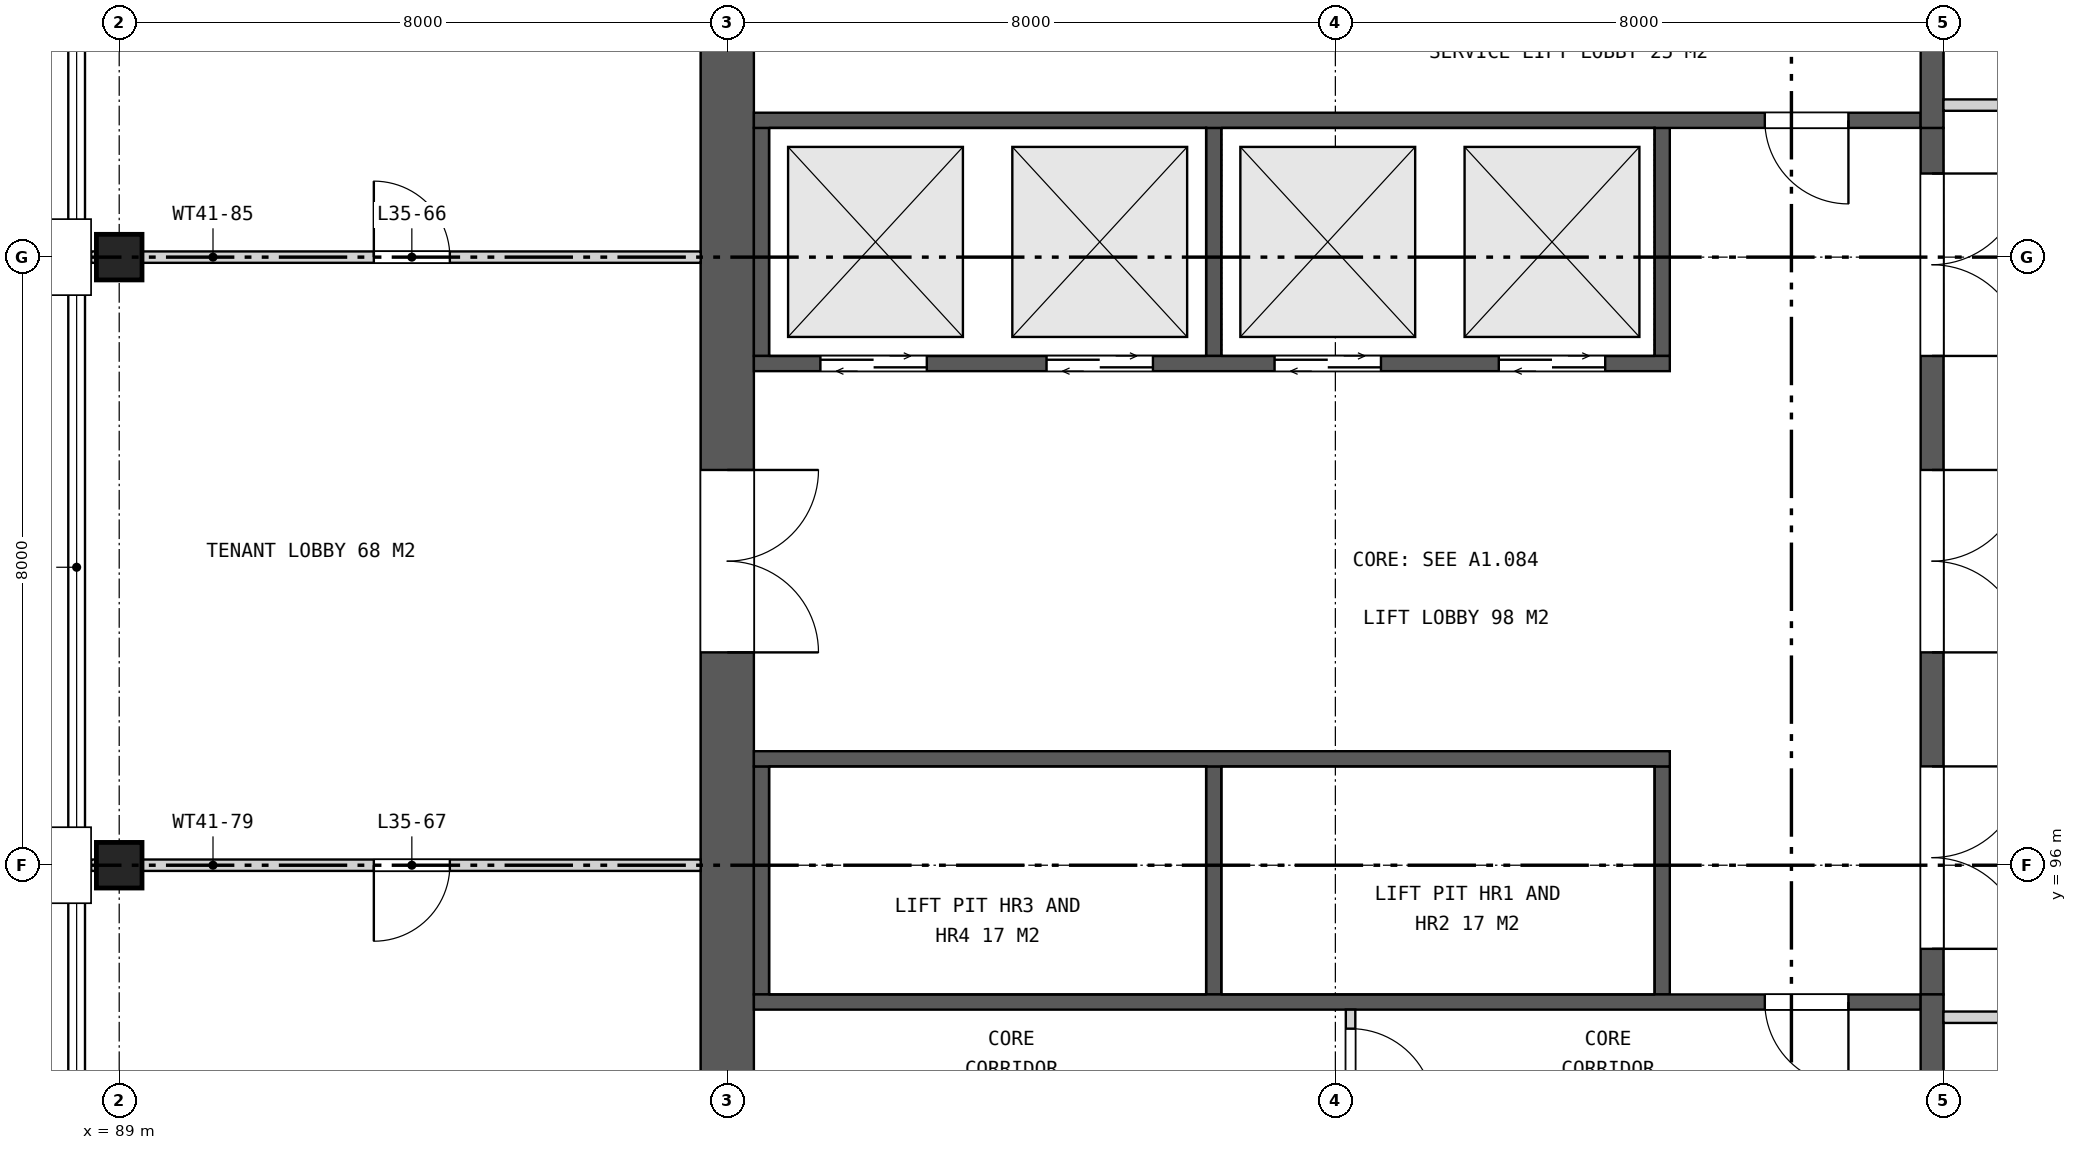
"""IFC4 building model, lengths in metres.
Left out: names, types, materials, properties, quantities, classifications, styles, units other than length and angle.
Written with IfcOpenShell. Run it as: python <this file> out.ifc"""

import sys

from ifc_helpers import new_model, si_unit, direction, frame, frame_2d, origin, origin_2d, place, context, subcontext, project, spatial, rectangle, extrude, element, fill, save


model = new_model("IFC4")
c1 = context("Model", 3, precision=1e-05, world=origin(), true_north=direction((0.0, 1.0)))
c2 = subcontext(c1, "Body", "Model", "MODEL_VIEW")
j1 = project(units=[si_unit("LENGTHUNIT", "METRE"), si_unit("PLANEANGLEUNIT", "RADIAN")], contexts=[c1])
p1 = place(None, origin())
s1 = spatial("IfcSite", under=j1, at=p1, CompositionType="ELEMENT")
p2 = place(p1, origin())
s2 = spatial("IfcBuilding", under=s1, at=p2, CompositionType="ELEMENT")
p3 = place(p2, frame((0.0, 0.0, 167.3)))
s3 = spatial("IfcBuildingStorey", under=s2, at=p3, CompositionType="ELEMENT", Elevation=167.3)
for number, where, z_axis, x_axis in (
    (1, (89.0, 96.0, 0.0), (0.0, 0.0, 1.0), (1.0, 0.0, 0.0)),
    (2, (89.0, 104.0, 0.0), (0.0, 0.0, 1.0), (1.0, 0.0, 0.0)),
):
    element("IfcColumn", number, at=place(p3, frame(where, z_axis=z_axis, x_axis=x_axis)), inside=s3, PredefinedType="COLUMN", context=c2, shape_type="SweptSolid", body=[
        extrude(rectangle(XDim=0.6, YDim=0.6, at=origin_2d()), origin(), (0.0, 0.0, 1.0), 4.2),
    ])
p4 = place(p3, frame((97.0, 111.65, 0.0), z_axis=(0.0, 0.0, 1.0), x_axis=(0.0, -1.0, 0.0)))
e3 = element("IfcWall", 3, at=p4, inside=s3, PredefinedType="SHEAR", context=c2, shape_type="SweptSolid", body=[
    extrude(rectangle(XDim=23.3, YDim=0.7, at=frame_2d((11.65, 0.0))), origin(), (0.0, 0.0, 1.0), 4.2),
])
p5 = place(p4, frame((10.45, 0.0, 0.0)))
e4 = element("IfcOpeningElement", 4, at=p5, cuts=e3, PredefinedType="OPENING", context=c2, shape_type="SweptSolid", body=[
    extrude(rectangle(XDim=2.4, YDim=2.4, at=frame_2d((1.2, 1.2))), frame((0.0, 0.36, 0.0), z_axis=(0.0, -1.0, 0.0), x_axis=(1.0, 0.0, 0.0)), (0.0, 0.0, 1.0), 0.72),
])
p6 = place(p3, frame((112.85, 105.7, 0.0), z_axis=(0.0, 0.0, 1.0), x_axis=(0.0, -1.0, 0.0)))
e5 = element("IfcWall", 5, at=p6, inside=s3, PredefinedType="SHEAR", context=c2, shape_type="SweptSolid", body=[
    extrude(rectangle(XDim=11.4, YDim=0.3, at=frame_2d((5.7, 0.0))), origin(), (0.0, 0.0, 1.0), 4.2),
])
p7 = place(p6, frame((0.6, 0.0, 0.0)))
e6 = element("IfcOpeningElement", 6, at=p7, cuts=e5, PredefinedType="OPENING", context=c2, shape_type="SweptSolid", body=[
    extrude(rectangle(XDim=2.4, YDim=2.4, at=frame_2d((1.2, 1.2))), frame((0.0, 0.16, 0.0), z_axis=(0.0, -1.0, 0.0), x_axis=(1.0, 0.0, 0.0)), (0.0, 0.0, 1.0), 0.32),
])
p8 = place(p6, frame((4.5, 0.0, 0.0)))
e7 = element("IfcOpeningElement", 7, at=p8, cuts=e5, PredefinedType="OPENING", context=c2, shape_type="SweptSolid", body=[
    extrude(rectangle(XDim=2.4, YDim=2.4, at=frame_2d((1.2, 1.2))), frame((0.0, 0.16, 0.0), z_axis=(0.0, -1.0, 0.0), x_axis=(1.0, 0.0, 0.0)), (0.0, 0.0, 1.0), 0.32),
])
p9 = place(p6, frame((8.4, 0.0, 0.0)))
e8 = element("IfcOpeningElement", 8, at=p9, cuts=e5, PredefinedType="OPENING", context=c2, shape_type="SweptSolid", body=[
    extrude(rectangle(XDim=2.4, YDim=2.4, at=frame_2d((1.2, 1.2))), frame((0.0, 0.16, 0.0), z_axis=(0.0, -1.0, 0.0), x_axis=(1.0, 0.0, 0.0)), (0.0, 0.0, 1.0), 0.32),
])
for number, where, z_axis, x_axis in (
    (9, (109.3, 97.3, 0.0), (0.0, 0.0, 1.0), (0.0, -1.0, 0.0)),
    (10, (103.4, 97.3, 0.0), (0.0, 0.0, 1.0), (0.0, -1.0, 0.0)),
    (11, (97.45, 97.3, 0.0), (0.0, 0.0, 1.0), (0.0, -1.0, 0.0)),
):
    element("IfcWall", number, at=place(p3, frame(where, z_axis=z_axis, x_axis=x_axis)), inside=s3, PredefinedType="SHEAR", context=c2, shape_type="SweptSolid", body=[
        extrude(rectangle(XDim=3.0, YDim=0.2, at=frame_2d((1.5, 0.0))), origin(), (0.0, 0.0, 1.0), 4.2),
    ])
p10 = place(p3, frame((109.4, 97.4, 0.0), z_axis=(0.0, 0.0, 1.0), x_axis=(-1.0, 0.0, 0.0)))
e12 = element("IfcWall", 12, at=p10, inside=s3, PredefinedType="SHEAR", context=c2, shape_type="SweptSolid", body=[
    extrude(rectangle(XDim=12.05, YDim=0.2, at=frame_2d((6.025, 0.0))), origin(), (0.0, 0.0, 1.0), 4.2),
])
for number, where, z_axis, x_axis in (
    (13, (109.3, 105.7, 0.0), (0.0, 0.0, 1.0), (0.0, -1.0, 0.0)),
    (14, (103.4, 105.7, 0.0), (0.0, 0.0, 1.0), (0.0, -1.0, 0.0)),
    (15, (97.45, 105.7, 0.0), (0.0, 0.0, 1.0), (0.0, -1.0, 0.0)),
):
    element("IfcWall", number, at=place(p3, frame(where, z_axis=z_axis, x_axis=x_axis)), inside=s3, PredefinedType="SHEAR", context=c2, shape_type="SweptSolid", body=[
        extrude(rectangle(XDim=3.0, YDim=0.2, at=frame_2d((1.5, 0.0))), origin(), (0.0, 0.0, 1.0), 4.2),
    ])
p11 = place(p3, frame((109.4, 102.6, 0.0), z_axis=(0.0, 0.0, 1.0), x_axis=(-1.0, 0.0, 0.0)))
e16 = element("IfcWall", 16, at=p11, inside=s3, PredefinedType="SHEAR", context=c2, shape_type="SweptSolid", body=[
    extrude(rectangle(XDim=12.05, YDim=0.2, at=frame_2d((6.025, 0.0))), origin(), (0.0, 0.0, 1.0), 4.2),
])
p12 = place(p11, frame((0.85, 0.0, 0.0)))
e17 = element("IfcOpeningElement", 17, at=p12, cuts=e16, PredefinedType="OPENING", context=c2, shape_type="SweptSolid", body=[
    extrude(rectangle(XDim=1.4, YDim=2.1, at=frame_2d((0.7, 1.05))), frame((0.0, 0.11, 0.0), z_axis=(0.0, -1.0, 0.0), x_axis=(1.0, 0.0, 0.0)), (0.0, 0.0, 1.0), 0.22),
])
p13 = place(p11, frame((3.8, 0.0, 0.0)))
e18 = element("IfcOpeningElement", 18, at=p13, cuts=e16, PredefinedType="OPENING", context=c2, shape_type="SweptSolid", body=[
    extrude(rectangle(XDim=1.4, YDim=2.1, at=frame_2d((0.7, 1.05))), frame((0.0, 0.11, 0.0), z_axis=(0.0, -1.0, 0.0), x_axis=(1.0, 0.0, 0.0)), (0.0, 0.0, 1.0), 0.22),
])
p14 = place(p11, frame((6.8, 0.0, 0.0)))
e19 = element("IfcOpeningElement", 19, at=p14, cuts=e16, PredefinedType="OPENING", context=c2, shape_type="SweptSolid", body=[
    extrude(rectangle(XDim=1.4, YDim=2.1, at=frame_2d((0.7, 1.05))), frame((0.0, 0.11, 0.0), z_axis=(0.0, -1.0, 0.0), x_axis=(1.0, 0.0, 0.0)), (0.0, 0.0, 1.0), 0.22),
])
p15 = place(p11, frame((9.775, 0.0, 0.0)))
e20 = element("IfcOpeningElement", 20, at=p15, cuts=e16, PredefinedType="OPENING", context=c2, shape_type="SweptSolid", body=[
    extrude(rectangle(XDim=1.4, YDim=2.1, at=frame_2d((0.7, 1.05))), frame((0.0, 0.11, 0.0), z_axis=(0.0, -1.0, 0.0), x_axis=(1.0, 0.0, 0.0)), (0.0, 0.0, 1.0), 0.22),
])
p16 = place(p3, frame((112.7, 94.2, 0.0), z_axis=(0.0, 0.0, 1.0), x_axis=(-1.0, 0.0, 0.0)))
e21 = element("IfcWall", 21, at=p16, inside=s3, PredefinedType="SHEAR", context=c2, shape_type="SweptSolid", body=[
    extrude(rectangle(XDim=15.35, YDim=0.2, at=frame_2d((7.675, 0.0))), origin(), (0.0, 0.0, 1.0), 4.2),
])
p17 = place(p16, frame((0.95, 0.0, 0.0)))
e22 = element("IfcOpeningElement", 22, at=p17, cuts=e21, PredefinedType="OPENING", context=c2, shape_type="SweptSolid", body=[
    extrude(rectangle(XDim=1.1, YDim=2.1, at=frame_2d((0.55, 1.05))), frame((0.0, 0.11, 0.0), z_axis=(0.0, -1.0, 0.0), x_axis=(1.0, 0.0, 0.0)), (0.0, 0.0, 1.0), 0.22),
])
p18 = place(p3, frame((112.85, 94.3, 0.0), z_axis=(0.0, 0.0, 1.0), x_axis=(0.0, -1.0, 0.0)))
e23 = element("IfcWall", 23, at=p18, inside=s3, PredefinedType="SHEAR", context=c2, shape_type="SweptSolid", body=[
    extrude(rectangle(XDim=5.95, YDim=0.3, at=frame_2d((2.975, 0.0))), origin(), (0.0, 0.0, 1.0), 4.2),
])
p19 = place(p3, frame((105.2, 94.1, 0.0), z_axis=(0.0, 0.0, 1.0), x_axis=(0.0, -1.0, 0.0)))
e24 = element("IfcWall", 24, at=p19, inside=s3, PredefinedType="PARTITIONING", context=c2, shape_type="SweptSolid", body=[
    extrude(rectangle(XDim=1.6, YDim=0.125, at=frame_2d((0.8, 0.0))), origin(), (0.0, 0.0, 1.0), 4.2),
])
p20 = place(p19, frame((0.25, 0.0, 0.0)))
e25 = element("IfcOpeningElement", 25, at=p20, cuts=e24, PredefinedType="OPENING", context=c2, shape_type="SweptSolid", body=[
    extrude(rectangle(XDim=1.1, YDim=2.1, at=frame_2d((0.55, 1.05))), frame((0.0, 0.073, 0.0), z_axis=(0.0, -1.0, 0.0), x_axis=(1.0, 0.0, 0.0)), (0.0, 0.0, 1.0), 0.145),
])
p21 = place(p3, frame((112.7, 105.8, 0.0), z_axis=(0.0, 0.0, 1.0), x_axis=(-1.0, 0.0, 0.0)))
e26 = element("IfcWall", 26, at=p21, inside=s3, PredefinedType="SHEAR", context=c2, shape_type="SweptSolid", body=[
    extrude(rectangle(XDim=15.35, YDim=0.2, at=frame_2d((7.675, 0.0))), origin(), (0.0, 0.0, 1.0), 4.2),
])
p22 = place(p21, frame((0.95, 0.0, 0.0)))
e27 = element("IfcOpeningElement", 27, at=p22, cuts=e26, PredefinedType="OPENING", context=c2, shape_type="SweptSolid", body=[
    extrude(rectangle(XDim=1.1, YDim=2.1, at=frame_2d((0.55, 1.05))), frame((0.0, 0.11, 0.0), z_axis=(0.0, -1.0, 0.0), x_axis=(1.0, 0.0, 0.0)), (0.0, 0.0, 1.0), 0.22),
])
p23 = place(p3, frame((112.85, 111.65, 0.0), z_axis=(0.0, 0.0, 1.0), x_axis=(0.0, -1.0, 0.0)))
e28 = element("IfcWall", 28, at=p23, inside=s3, PredefinedType="SHEAR", context=c2, shape_type="SweptSolid", body=[
    extrude(rectangle(XDim=5.95, YDim=0.3, at=frame_2d((2.975, 0.0))), origin(), (0.0, 0.0, 1.0), 4.2),
])
p24 = place(p3, frame((113.0, 94.0, 0.0), z_axis=(0.0, 0.0, 1.0), x_axis=(1.0, 0.0, 0.0)))
e29 = element("IfcWall", 29, at=p24, inside=s3, PredefinedType="PARTITIONING", context=c2, shape_type="SweptSolid", body=[
    extrude(rectangle(XDim=10.725, YDim=0.15, at=frame_2d((5.363, 0.0))), origin(), (0.0, 0.0, 1.0), 3.26),
])
p25 = place(p3, frame((88.63, 96.0, 0.0), z_axis=(0.0, 0.0, 1.0), x_axis=(1.0, 0.0, 0.0)))
e30 = element("IfcWall", 30, at=p25, inside=s3, PredefinedType="PARTITIONING", context=c2, shape_type="SweptSolid", body=[
    extrude(rectangle(XDim=8.02, YDim=0.15, at=frame_2d((4.01, 0.0))), origin(), (0.0, 0.0, 1.0), 3.26),
])
p26 = place(p25, frame((3.72, 0.0, 0.0)))
e31 = element("IfcOpeningElement", 31, at=p26, cuts=e30, PredefinedType="OPENING", context=c2, shape_type="SweptSolid", body=[
    extrude(rectangle(XDim=1.0, YDim=2.1, at=frame_2d((0.5, 1.05))), frame((0.0, 0.085, 0.0), z_axis=(0.0, -1.0, 0.0), x_axis=(1.0, 0.0, 0.0)), (0.0, 0.0, 1.0), 0.17),
])
p27 = place(p3, frame((88.63, 104.0, 0.0), z_axis=(0.0, 0.0, 1.0), x_axis=(1.0, 0.0, 0.0)))
e32 = element("IfcWall", 32, at=p27, inside=s3, PredefinedType="PARTITIONING", context=c2, shape_type="SweptSolid", body=[
    extrude(rectangle(XDim=8.02, YDim=0.15, at=frame_2d((4.01, 0.0))), origin(), (0.0, 0.0, 1.0), 3.26),
])
p28 = place(p27, frame((3.72, 0.0, 0.0)))
e33 = element("IfcOpeningElement", 33, at=p28, cuts=e32, PredefinedType="OPENING", context=c2, shape_type="SweptSolid", body=[
    extrude(rectangle(XDim=1.0, YDim=2.1, at=frame_2d((0.5, 1.05))), frame((0.0, 0.085, 0.0), z_axis=(0.0, -1.0, 0.0), x_axis=(1.0, 0.0, 0.0)), (0.0, 0.0, 1.0), 0.17),
])
p29 = place(p3, frame((113.0, 106.0, 0.0), z_axis=(0.0, 0.0, 1.0), x_axis=(1.0, 0.0, 0.0)))
e34 = element("IfcWall", 34, at=p29, inside=s3, PredefinedType="PARTITIONING", context=c2, shape_type="SweptSolid", body=[
    extrude(rectangle(XDim=10.725, YDim=0.15, at=frame_2d((5.363, 0.0))), origin(), (0.0, 0.0, 1.0), 3.26),
])
p30 = place(p5, origin())
e35 = element("IfcDoor", 35, at=p30, inside=s3, OperationType="DOUBLE_DOOR_SINGLE_SWING", PredefinedType="DOOR", context=c2, shape_type="SweptSolid", body=[
    extrude(rectangle(XDim=2.4, YDim=2.4, at=frame_2d((1.2, 1.2))), frame((0.0, 0.025, 0.0), z_axis=(0.0, -1.0, 0.0), x_axis=(1.0, 0.0, 0.0)), (0.0, 0.0, 1.0), 0.05),
])
fill(e4, e35)
p31 = place(p7, origin())
e36 = element("IfcDoor", 36, at=p31, inside=s3, OperationType="DOUBLE_DOOR_SINGLE_SWING", PredefinedType="DOOR", context=c2, shape_type="SweptSolid", body=[
    extrude(rectangle(XDim=2.4, YDim=2.4, at=frame_2d((1.2, 1.2))), frame((0.0, 0.025, 0.0), z_axis=(0.0, -1.0, 0.0), x_axis=(1.0, 0.0, 0.0)), (0.0, 0.0, 1.0), 0.05),
])
fill(e6, e36)
p32 = place(p8, origin())
e37 = element("IfcDoor", 37, at=p32, inside=s3, OperationType="DOUBLE_DOOR_SINGLE_SWING", PredefinedType="DOOR", context=c2, shape_type="SweptSolid", body=[
    extrude(rectangle(XDim=2.4, YDim=2.4, at=frame_2d((1.2, 1.2))), frame((0.0, 0.025, 0.0), z_axis=(0.0, -1.0, 0.0), x_axis=(1.0, 0.0, 0.0)), (0.0, 0.0, 1.0), 0.05),
])
fill(e7, e37)
p33 = place(p9, origin())
e38 = element("IfcDoor", 38, at=p33, inside=s3, OperationType="DOUBLE_DOOR_SINGLE_SWING", PredefinedType="DOOR", context=c2, shape_type="SweptSolid", body=[
    extrude(rectangle(XDim=2.4, YDim=2.4, at=frame_2d((1.2, 1.2))), frame((0.0, 0.025, 0.0), z_axis=(0.0, -1.0, 0.0), x_axis=(1.0, 0.0, 0.0)), (0.0, 0.0, 1.0), 0.05),
])
fill(e8, e38)
p34 = place(p12, origin())
e39 = element("IfcDoor", 39, at=p34, inside=s3, OperationType="DOUBLE_DOOR_SLIDING", PredefinedType="DOOR", context=c2, shape_type="SweptSolid", body=[
    extrude(rectangle(XDim=1.4, YDim=2.1, at=frame_2d((0.7, 1.05))), frame((0.0, 0.025, 0.0), z_axis=(0.0, -1.0, 0.0), x_axis=(1.0, 0.0, 0.0)), (0.0, 0.0, 1.0), 0.05),
])
fill(e17, e39)
p35 = place(p13, origin())
e40 = element("IfcDoor", 40, at=p35, inside=s3, OperationType="DOUBLE_DOOR_SLIDING", PredefinedType="DOOR", context=c2, shape_type="SweptSolid", body=[
    extrude(rectangle(XDim=1.4, YDim=2.1, at=frame_2d((0.7, 1.05))), frame((0.0, 0.025, 0.0), z_axis=(0.0, -1.0, 0.0), x_axis=(1.0, 0.0, 0.0)), (0.0, 0.0, 1.0), 0.05),
])
fill(e18, e40)
p36 = place(p14, origin())
e41 = element("IfcDoor", 41, at=p36, inside=s3, OperationType="DOUBLE_DOOR_SLIDING", PredefinedType="DOOR", context=c2, shape_type="SweptSolid", body=[
    extrude(rectangle(XDim=1.4, YDim=2.1, at=frame_2d((0.7, 1.05))), frame((0.0, 0.025, 0.0), z_axis=(0.0, -1.0, 0.0), x_axis=(1.0, 0.0, 0.0)), (0.0, 0.0, 1.0), 0.05),
])
fill(e19, e41)
p37 = place(p15, origin())
e42 = element("IfcDoor", 42, at=p37, inside=s3, OperationType="DOUBLE_DOOR_SLIDING", PredefinedType="DOOR", context=c2, shape_type="SweptSolid", body=[
    extrude(rectangle(XDim=1.4, YDim=2.1, at=frame_2d((0.7, 1.05))), frame((0.0, 0.025, 0.0), z_axis=(0.0, -1.0, 0.0), x_axis=(1.0, 0.0, 0.0)), (0.0, 0.0, 1.0), 0.05),
])
fill(e20, e42)
p38 = place(p17, origin())
e43 = element("IfcDoor", 43, at=p38, inside=s3, OperationType="SINGLE_SWING_LEFT", PredefinedType="DOOR", context=c2, shape_type="SweptSolid", body=[
    extrude(rectangle(XDim=1.1, YDim=2.1, at=frame_2d((0.55, 1.05))), frame((0.0, 0.025, 0.0), z_axis=(0.0, -1.0, 0.0), x_axis=(1.0, 0.0, 0.0)), (0.0, 0.0, 1.0), 0.05),
])
fill(e22, e43)
p39 = place(p20, origin())
e44 = element("IfcDoor", 44, at=p39, inside=s3, OperationType="SINGLE_SWING_RIGHT", PredefinedType="DOOR", context=c2, shape_type="SweptSolid", body=[
    extrude(rectangle(XDim=1.1, YDim=2.1, at=frame_2d((0.55, 1.05))), frame((0.0, 0.025, 0.0), z_axis=(0.0, -1.0, 0.0), x_axis=(1.0, 0.0, 0.0)), (0.0, 0.0, 1.0), 0.05),
])
fill(e25, e44)
p40 = place(p22, origin())
e45 = element("IfcDoor", 45, at=p40, inside=s3, OperationType="SINGLE_SWING_LEFT", PredefinedType="DOOR", context=c2, shape_type="SweptSolid", body=[
    extrude(rectangle(XDim=1.1, YDim=2.1, at=frame_2d((0.55, 1.05))), frame((0.0, 0.025, 0.0), z_axis=(0.0, -1.0, 0.0), x_axis=(1.0, 0.0, 0.0)), (0.0, 0.0, 1.0), 0.05),
])
fill(e27, e45)
p41 = place(p28, origin())
e46 = element("IfcDoor", 46, at=p41, inside=s3, OperationType="SINGLE_SWING_LEFT", PredefinedType="DOOR", context=c2, shape_type="SweptSolid", body=[
    extrude(rectangle(XDim=1.0, YDim=2.1, at=frame_2d((0.5, 1.05))), frame((0.0, 0.025, 0.0), z_axis=(0.0, -1.0, 0.0), x_axis=(1.0, 0.0, 0.0)), (0.0, 0.0, 1.0), 0.05),
])
fill(e33, e46)
p42 = place(p26, frame((1.0, 0.0, 0.0), z_axis=(0.0, 0.0, 1.0), x_axis=(-1.0, 0.0, 0.0)))
e47 = element("IfcDoor", 47, at=p42, inside=s3, OperationType="SINGLE_SWING_RIGHT", PredefinedType="DOOR", context=c2, shape_type="SweptSolid", body=[
    extrude(rectangle(XDim=1.0, YDim=2.1, at=frame_2d((0.5, 1.05))), frame((0.0, 0.025, 0.0), z_axis=(0.0, -1.0, 0.0), x_axis=(1.0, 0.0, 0.0)), (0.0, 0.0, 1.0), 0.05),
])
fill(e31, e47)
save(model, sys.argv[1])
